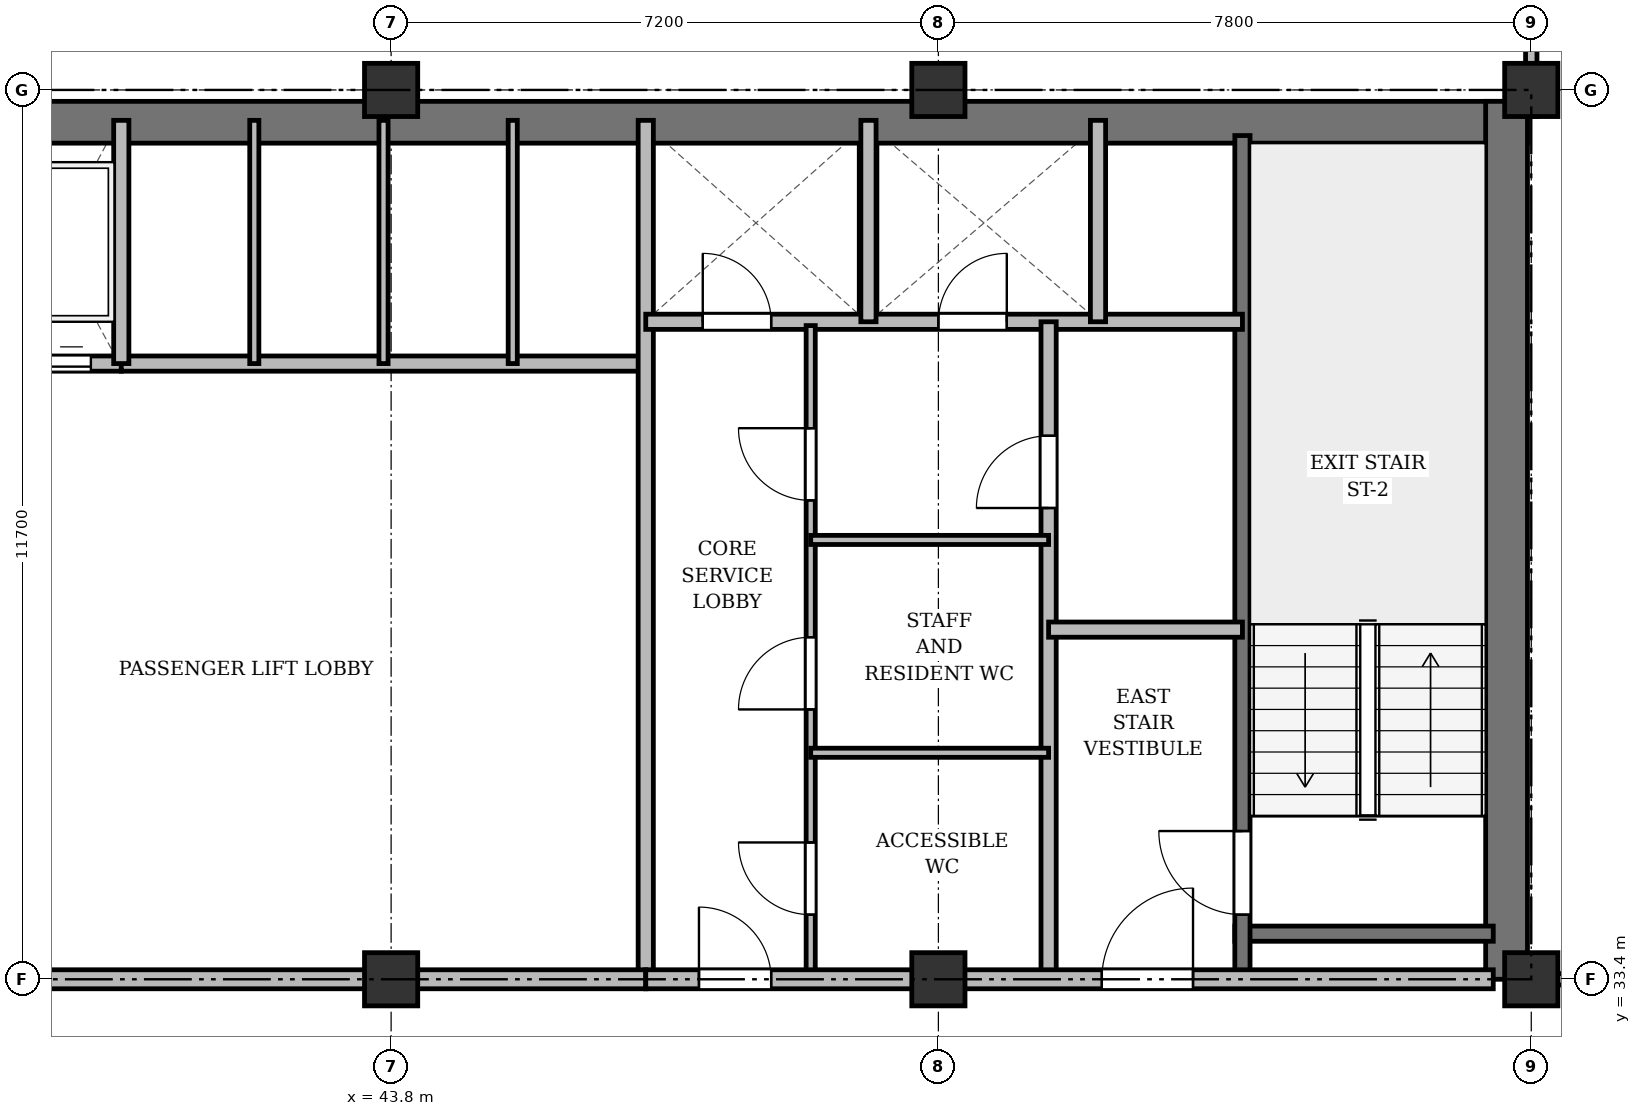
"""IFC4 building model, lengths in metres.
Left out: names, types, materials, properties, quantities, classifications, styles, units other than length and angle.
Written with IfcOpenShell. Run it as: python <this file> out.ifc"""

import sys

from ifc_helpers import new_model, si_unit, direction, frame, frame_2d, origin, origin_2d, place, context, subcontext, project, spatial, rectangle, extrude, source, transform, mapped, element, fill, save


model = new_model("IFC4")
c1 = context("Model", 3, precision=1e-05, world=origin(), true_north=direction((0.0, 1.0)))
c2 = subcontext(c1, "Body", "Model", "MODEL_VIEW")
j1 = project(units=[si_unit("LENGTHUNIT", "METRE"), si_unit("PLANEANGLEUNIT", "RADIAN")], contexts=[c1])
p1 = place(None, origin())
s1 = spatial("IfcSite", under=j1, at=p1, CompositionType="ELEMENT")
p2 = place(p1, origin())
s2 = spatial("IfcBuilding", under=s1, at=p2, CompositionType="ELEMENT")
p3 = place(p2, frame((0.0, 0.0, 194.1)))
s3 = spatial("IfcBuildingStorey", under=s2, at=p3, CompositionType="ELEMENT", Elevation=194.1)
m1 = source(origin(), c2, "Body", "SweptSolid", [
    extrude(rectangle(XDim=0.7, YDim=0.7, at=origin_2d()), origin(), (0.0, 0.0, 1.0), 3.6),
])
for number, where, z_axis, x_axis in (
    (1, (43.8, 33.4, 0.0), (0.0, 0.0, 1.0), (1.0, 0.0, 0.0)),
    (2, (43.8, 45.1, 0.0), (0.0, 0.0, 1.0), (1.0, 0.0, 0.0)),
    (3, (51.0, 33.4, 0.0), (0.0, 0.0, 1.0), (1.0, 0.0, 0.0)),
    (4, (51.0, 45.1, 0.0), (0.0, 0.0, 1.0), (1.0, 0.0, 0.0)),
    (5, (58.8, 33.4, 0.0), (0.0, 0.0, 1.0), (1.0, 0.0, 0.0)),
    (6, (58.8, 45.1, 0.0), (0.0, 0.0, 1.0), (1.0, 0.0, 0.0)),
):
    element("IfcColumn", number, at=place(p3, frame(where, z_axis=z_axis, x_axis=x_axis)), inside=s3, PredefinedType="COLUMN", context=c2, shape_type="MappedRepresentation", body=[
        mapped(m1, transform((0.0, 0.0, 0.0), x_axis=(1.0, 0.0, 0.0), y_axis=(0.0, 1.0, 0.0), z_axis=(0.0, 0.0, 1.0), scale=1.0)),
    ])
p4 = place(p3, frame((15.65, 44.675, 0.0), z_axis=(0.0, 0.0, 1.0), x_axis=(1.0, 0.0, 0.0)))
e7 = element("IfcWall", 7, at=p4, inside=s3, PredefinedType="SHEAR", context=c2, shape_type="SweptSolid", body=[
    extrude(rectangle(XDim=43.1, YDim=0.55, at=frame_2d((21.55, 0.0))), origin(), (0.0, 0.0, 1.0), 3.36),
])
p5 = place(p3, frame((58.475, 33.4, 0.0), z_axis=(0.0, 0.0, 1.0), x_axis=(0.0, 1.0, 0.0)))
e8 = element("IfcWall", 8, at=p5, inside=s3, PredefinedType="SHEAR", context=c2, shape_type="SweptSolid", body=[
    extrude(rectangle(XDim=11.55, YDim=0.55, at=frame_2d((5.775, 0.0))), origin(), (0.0, 0.0, 1.0), 3.36),
])
p6 = place(p3, frame((54.9, 34.0, 0.0), z_axis=(0.0, 0.0, 1.0), x_axis=(1.0, 0.0, 0.0)))
e9 = element("IfcWall", 9, at=p6, inside=s3, PredefinedType="SHEAR", context=c2, shape_type="SweptSolid", body=[
    extrude(rectangle(XDim=3.4, YDim=0.2, at=frame_2d((1.7, 0.0))), origin(), (0.0, 0.0, 1.0), 3.36),
])
p7 = place(p3, frame((55.0, 33.4, 0.0), z_axis=(0.0, 0.0, 1.0), x_axis=(0.0, 1.0, 0.0)))
e10 = element("IfcWall", 10, at=p7, inside=s3, PredefinedType="SHEAR", context=c2, shape_type="SweptSolid", body=[
    extrude(rectangle(XDim=11.1, YDim=0.2, at=frame_2d((5.55, 0.0))), origin(), (0.0, 0.0, 1.0), 3.36),
])
p8 = place(p7, frame((0.85, 0.0, 0.0)))
e11 = element("IfcOpeningElement", 11, at=p8, cuts=e10, PredefinedType="OPENING", context=c2, shape_type="SweptSolid", body=[
    extrude(rectangle(XDim=1.1, YDim=2.15, at=frame_2d((0.55, 1.075))), frame((0.0, 0.11, 0.0), z_axis=(0.0, -1.0, 0.0), x_axis=(1.0, 0.0, 0.0)), (0.0, 0.0, 1.0), 0.22),
])
p9 = place(p3, frame((33.35, 41.5, 0.0), z_axis=(0.0, 0.0, 1.0), x_axis=(1.0, 0.0, 0.0)))
e12 = element("IfcWall", 12, at=p9, inside=s3, PredefinedType="SOLIDWALL", context=c2, shape_type="SweptSolid", body=[
    extrude(rectangle(XDim=6.9, YDim=0.2, at=frame_2d((3.45, 0.0))), origin(), (0.0, 0.0, 1.0), 3.36),
])
p10 = place(p9, frame((0.35, 0.0, 0.0)))
e13 = element("IfcOpeningElement", 13, at=p10, cuts=e12, PredefinedType="OPENING", context=c2, shape_type="SweptSolid", body=[
    extrude(rectangle(XDim=1.05, YDim=2.15, at=frame_2d((0.525, 1.075))), frame((0.0, 0.11, 0.0), z_axis=(0.0, -1.0, 0.0), x_axis=(1.0, 0.0, 0.0)), (0.0, 0.0, 1.0), 0.22),
])
p11 = place(p9, frame((2.05, 0.0, 0.0)))
e14 = element("IfcOpeningElement", 14, at=p11, cuts=e12, PredefinedType="OPENING", context=c2, shape_type="SweptSolid", body=[
    extrude(rectangle(XDim=1.05, YDim=2.15, at=frame_2d((0.525, 1.075))), frame((0.0, 0.11, 0.0), z_axis=(0.0, -1.0, 0.0), x_axis=(1.0, 0.0, 0.0)), (0.0, 0.0, 1.0), 0.22),
])
p12 = place(p9, frame((3.75, 0.0, 0.0)))
e15 = element("IfcOpeningElement", 15, at=p12, cuts=e12, PredefinedType="OPENING", context=c2, shape_type="SweptSolid", body=[
    extrude(rectangle(XDim=1.05, YDim=2.15, at=frame_2d((0.525, 1.075))), frame((0.0, 0.11, 0.0), z_axis=(0.0, -1.0, 0.0), x_axis=(1.0, 0.0, 0.0)), (0.0, 0.0, 1.0), 0.22),
])
p13 = place(p9, frame((5.45, 0.0, 0.0)))
e16 = element("IfcOpeningElement", 16, at=p13, cuts=e12, PredefinedType="OPENING", context=c2, shape_type="SweptSolid", body=[
    extrude(rectangle(XDim=1.05, YDim=2.15, at=frame_2d((0.525, 1.075))), frame((0.0, 0.11, 0.0), z_axis=(0.0, -1.0, 0.0), x_axis=(1.0, 0.0, 0.0)), (0.0, 0.0, 1.0), 0.22),
])
p14 = place(p3, frame((40.25, 41.5, 0.0), z_axis=(0.0, 0.0, 1.0), x_axis=(1.0, 0.0, 0.0)))
e17 = element("IfcWall", 17, at=p14, inside=s3, PredefinedType="SOLIDWALL", context=c2, shape_type="SweptSolid", body=[
    extrude(rectangle(XDim=6.9, YDim=0.2, at=frame_2d((3.45, 0.0))), origin(), (0.0, 0.0, 1.0), 2.86),
])
p15 = place(p3, frame((40.25, 41.5, 0.0), z_axis=(0.0, 0.0, 1.0), x_axis=(0.0, 1.0, 0.0)))
e18 = element("IfcWall", 18, at=p15, inside=s3, PredefinedType="SOLIDWALL", context=c2, shape_type="SweptSolid", body=[
    extrude(rectangle(XDim=3.2, YDim=0.2, at=frame_2d((1.6, 0.0))), origin(), (0.0, 0.0, 1.0), 3.36),
])
p16 = place(p3, frame((42.0, 41.5, 0.0), z_axis=(0.0, 0.0, 1.0), x_axis=(0.0, 1.0, 0.0)))
e19 = element("IfcWall", 19, at=p16, inside=s3, PredefinedType="PARTITIONING", context=c2, shape_type="SweptSolid", body=[
    extrude(rectangle(XDim=3.2, YDim=0.12, at=frame_2d((1.6, 0.0))), origin(), (0.0, 0.0, 1.0), 3.36),
])
p17 = place(p3, frame((43.7, 41.5, 0.0), z_axis=(0.0, 0.0, 1.0), x_axis=(0.0, 1.0, 0.0)))
e20 = element("IfcWall", 20, at=p17, inside=s3, PredefinedType="PARTITIONING", context=c2, shape_type="SweptSolid", body=[
    extrude(rectangle(XDim=3.2, YDim=0.12, at=frame_2d((1.6, 0.0))), origin(), (0.0, 0.0, 1.0), 2.86),
])
p18 = place(p3, frame((45.4, 41.5, 0.0), z_axis=(0.0, 0.0, 1.0), x_axis=(0.0, 1.0, 0.0)))
e21 = element("IfcWall", 21, at=p18, inside=s3, PredefinedType="PARTITIONING", context=c2, shape_type="SweptSolid", body=[
    extrude(rectangle(XDim=3.2, YDim=0.12, at=frame_2d((1.6, 0.0))), origin(), (0.0, 0.0, 1.0), 3.36),
])
p19 = place(p3, frame((47.15, 33.4, 0.0), z_axis=(0.0, 0.0, 1.0), x_axis=(0.0, 1.0, 0.0)))
e22 = element("IfcWall", 22, at=p19, inside=s3, PredefinedType="SOLIDWALL", context=c2, shape_type="SweptSolid", body=[
    extrude(rectangle(XDim=11.3, YDim=0.2, at=frame_2d((5.65, 0.0))), origin(), (0.0, 0.0, 1.0), 2.91),
])
p20 = place(p3, frame((33.3, 33.4, 0.0), z_axis=(0.0, 0.0, 1.0), x_axis=(1.0, 0.0, 0.0)))
e23 = element("IfcWall", 23, at=p20, inside=s3, PredefinedType="PARTITIONING", context=c2, shape_type="SweptSolid", body=[
    extrude(rectangle(XDim=13.85, YDim=0.25, at=frame_2d((6.925, 0.0))), origin(), (0.0, 0.0, 1.0), 2.91),
])
p21 = place(p20, frame((4.2, 0.0, 0.0)))
e24 = element("IfcOpeningElement", 24, at=p21, cuts=e23, PredefinedType="OPENING", context=c2, shape_type="SweptSolid", body=[
    extrude(rectangle(XDim=1.6, YDim=2.2, at=frame_2d((0.8, 1.1))), frame((0.0, 0.135, 0.0), z_axis=(0.0, -1.0, 0.0), x_axis=(1.0, 0.0, 0.0)), (0.0, 0.0, 1.0), 0.27),
])
p22 = place(p3, frame((47.15, 42.05, 0.0), z_axis=(0.0, 0.0, 1.0), x_axis=(1.0, 0.0, 0.0)))
e25 = element("IfcWall", 25, at=p22, inside=s3, PredefinedType="SOLIDWALL", context=c2, shape_type="SweptSolid", body=[
    extrude(rectangle(XDim=7.85, YDim=0.2, at=frame_2d((3.925, 0.0))), origin(), (0.0, 0.0, 1.0), 2.86),
])
p23 = place(p22, frame((0.75, 0.0, 0.0)))
e26 = element("IfcOpeningElement", 26, at=p23, cuts=e25, PredefinedType="OPENING", context=c2, shape_type="SweptSolid", body=[
    extrude(rectangle(XDim=0.9, YDim=2.1, at=frame_2d((0.45, 1.05))), frame((0.0, 0.11, 0.0), z_axis=(0.0, -1.0, 0.0), x_axis=(1.0, 0.0, 0.0)), (0.0, 0.0, 1.0), 0.22),
])
p24 = place(p22, frame((3.85, 0.0, 0.0)))
e27 = element("IfcOpeningElement", 27, at=p24, cuts=e25, PredefinedType="OPENING", context=c2, shape_type="SweptSolid", body=[
    extrude(rectangle(XDim=0.9, YDim=2.1, at=frame_2d((0.45, 1.05))), frame((0.0, 0.11, 0.0), z_axis=(0.0, -1.0, 0.0), x_axis=(1.0, 0.0, 0.0)), (0.0, 0.0, 1.0), 0.22),
])
for number, where, z_axis, x_axis in (
    (28, (50.08, 42.05, 0.0), (0.0, 0.0, 1.0), (0.0, 1.0, 0.0)),
    (29, (53.1, 42.05, 0.0), (0.0, 0.0, 1.0), (0.0, 1.0, 0.0)),
):
    element("IfcWall", number, at=place(p3, frame(where, z_axis=z_axis, x_axis=x_axis)), inside=s3, PredefinedType="SOLIDWALL", context=c2, shape_type="SweptSolid", body=[
        extrude(rectangle(XDim=2.65, YDim=0.2, at=frame_2d((1.325, 0.0))), origin(), (0.0, 0.0, 1.0), 3.36),
    ])
p25 = place(p3, frame((52.45, 33.4, 0.0), z_axis=(0.0, 0.0, 1.0), x_axis=(0.0, 1.0, 0.0)))
e30 = element("IfcWall", 30, at=p25, inside=s3, PredefinedType="PARTITIONING", context=c2, shape_type="SweptSolid", body=[
    extrude(rectangle(XDim=8.65, YDim=0.2, at=frame_2d((4.325, 0.0))), origin(), (0.0, 0.0, 1.0), 2.91),
])
p26 = place(p25, frame((6.2, 0.0, 0.0)))
e31 = element("IfcOpeningElement", 31, at=p26, cuts=e30, PredefinedType="OPENING", context=c2, shape_type="SweptSolid", body=[
    extrude(rectangle(XDim=0.95, YDim=2.15, at=frame_2d((0.475, 1.075))), frame((0.0, 0.11, 0.0), z_axis=(0.0, -1.0, 0.0), x_axis=(1.0, 0.0, 0.0)), (0.0, 0.0, 1.0), 0.22),
])
p27 = place(p3, frame((52.45, 38.0, 0.0), z_axis=(0.0, 0.0, 1.0), x_axis=(1.0, 0.0, 0.0)))
e32 = element("IfcWall", 32, at=p27, inside=s3, PredefinedType="PARTITIONING", context=c2, shape_type="SweptSolid", body=[
    extrude(rectangle(XDim=2.55, YDim=0.2, at=frame_2d((1.275, 0.0))), origin(), (0.0, 0.0, 1.0), 3.36),
])
p28 = place(p3, frame((49.32, 33.4, 0.0), z_axis=(0.0, 0.0, 1.0), x_axis=(0.0, 1.0, 0.0)))
e33 = element("IfcWall", 33, at=p28, inside=s3, PredefinedType="PARTITIONING", context=c2, shape_type="SweptSolid", body=[
    extrude(rectangle(XDim=8.6, YDim=0.12, at=frame_2d((4.3, 0.0))), origin(), (0.0, 0.0, 1.0), 2.91),
])
p29 = place(p28, frame((0.85, 0.0, 0.0)))
e34 = element("IfcOpeningElement", 34, at=p29, cuts=e33, PredefinedType="OPENING", context=c2, shape_type="SweptSolid", body=[
    extrude(rectangle(XDim=0.95, YDim=2.15, at=frame_2d((0.475, 1.075))), frame((0.0, 0.07, 0.0), z_axis=(0.0, -1.0, 0.0), x_axis=(1.0, 0.0, 0.0)), (0.0, 0.0, 1.0), 0.14),
])
p30 = place(p28, frame((3.55, 0.0, 0.0)))
e35 = element("IfcOpeningElement", 35, at=p30, cuts=e33, PredefinedType="OPENING", context=c2, shape_type="SweptSolid", body=[
    extrude(rectangle(XDim=0.95, YDim=2.15, at=frame_2d((0.475, 1.075))), frame((0.0, 0.07, 0.0), z_axis=(0.0, -1.0, 0.0), x_axis=(1.0, 0.0, 0.0)), (0.0, 0.0, 1.0), 0.14),
])
p31 = place(p28, frame((6.3, 0.0, 0.0)))
e36 = element("IfcOpeningElement", 36, at=p31, cuts=e33, PredefinedType="OPENING", context=c2, shape_type="SweptSolid", body=[
    extrude(rectangle(XDim=0.95, YDim=2.15, at=frame_2d((0.475, 1.075))), frame((0.0, 0.07, 0.0), z_axis=(0.0, -1.0, 0.0), x_axis=(1.0, 0.0, 0.0)), (0.0, 0.0, 1.0), 0.14),
])
for number, where, z_axis, x_axis in (
    (37, (49.32, 36.38, 0.0), (0.0, 0.0, 1.0), (1.0, 0.0, 0.0)),
    (38, (49.32, 39.18, 0.0), (0.0, 0.0, 1.0), (1.0, 0.0, 0.0)),
):
    element("IfcWall", number, at=place(p3, frame(where, z_axis=z_axis, x_axis=x_axis)), inside=s3, PredefinedType="PARTITIONING", context=c2, shape_type="SweptSolid", body=[
        extrude(rectangle(XDim=3.13, YDim=0.12, at=frame_2d((1.565, 0.0))), origin(), (0.0, 0.0, 1.0), 2.86),
    ])
p32 = place(p3, frame((47.15, 33.4, 0.0), z_axis=(0.0, 0.0, 1.0), x_axis=(1.0, 0.0, 0.0)))
e39 = element("IfcWall", 39, at=p32, inside=s3, PredefinedType="PARTITIONING", context=c2, shape_type="SweptSolid", body=[
    extrude(rectangle(XDim=11.15, YDim=0.25, at=frame_2d((5.575, 0.0))), origin(), (0.0, 0.0, 1.0), 2.91),
])
p33 = place(p32, frame((0.7, 0.0, 0.0)))
e40 = element("IfcOpeningElement", 40, at=p33, cuts=e39, PredefinedType="OPENING", context=c2, shape_type="SweptSolid", body=[
    extrude(rectangle(XDim=0.95, YDim=2.15, at=frame_2d((0.475, 1.075))), frame((0.0, 0.135, 0.0), z_axis=(0.0, -1.0, 0.0), x_axis=(1.0, 0.0, 0.0)), (0.0, 0.0, 1.0), 0.27),
])
p34 = place(p32, frame((6.0, 0.0, 0.0)))
e41 = element("IfcOpeningElement", 41, at=p34, cuts=e39, PredefinedType="OPENING", context=c2, shape_type="SweptSolid", body=[
    extrude(rectangle(XDim=1.2, YDim=2.15, at=frame_2d((0.6, 1.075))), frame((0.0, 0.135, 0.0), z_axis=(0.0, -1.0, 0.0), x_axis=(1.0, 0.0, 0.0)), (0.0, 0.0, 1.0), 0.27),
])
p35 = place(p3, frame((58.8, 33.4, 0.0), z_axis=(0.0, 0.0, 1.0), x_axis=(1.0, 0.0, 0.0)))
e42 = element("IfcWall", 42, at=p35, inside=s3, PredefinedType="PARTITIONING", context=c2, shape_type="SweptSolid", body=[
    extrude(rectangle(XDim=7.35, YDim=0.15, at=frame_2d((3.675, 0.0))), origin(), (0.0, 0.0, 1.0), 2.91),
])
p36 = place(p35, frame((3.192, 0.0, 0.0)))
e43 = element("IfcOpeningElement", 43, at=p36, cuts=e42, PredefinedType="OPENING", context=c2, shape_type="SweptSolid", body=[
    extrude(rectangle(XDim=0.95, YDim=2.15, at=frame_2d((0.475, 1.075))), frame((0.0, 0.085, 0.0), z_axis=(0.0, -1.0, 0.0), x_axis=(1.0, 0.0, 0.0)), (0.0, 0.0, 1.0), 0.17),
])
p37 = place(p3, frame((58.8, 44.75, 0.0), z_axis=(0.0, 0.0, 1.0), x_axis=(0.0, 1.0, 0.0)))
e44 = element("IfcWall", 44, at=p37, inside=s3, PredefinedType="PARTITIONING", context=c2, shape_type="SweptSolid", body=[
    extrude(rectangle(XDim=3.61, YDim=0.15, at=frame_2d((1.805, 0.0))), origin(), (0.0, 0.0, 1.0), 2.86),
])
p38 = place(p37, frame((1.1, 0.0, 0.0)))
e45 = element("IfcOpeningElement", 45, at=p38, cuts=e44, PredefinedType="OPENING", context=c2, shape_type="SweptSolid", body=[
    extrude(rectangle(XDim=0.95, YDim=2.15, at=frame_2d((0.475, 1.075))), frame((0.0, 0.085, 0.0), z_axis=(0.0, -1.0, 0.0), x_axis=(1.0, 0.0, 0.0)), (0.0, 0.0, 1.0), 0.17),
])
m2 = source(origin(), c2, "Body", "SweptSolid", [
    extrude(rectangle(XDim=1.1, YDim=2.15, at=frame_2d((0.55, 1.075))), frame((0.0, 0.025, 0.0), z_axis=(0.0, -1.0, 0.0), x_axis=(1.0, 0.0, 0.0)), (0.0, 0.0, 1.0), 0.05),
])
p39 = place(p8, origin())
e46 = element("IfcDoor", 46, at=p39, inside=s3, OperationType="SINGLE_SWING_RIGHT", PredefinedType="DOOR", context=c2, shape_type="MappedRepresentation", body=[
    mapped(m2, transform((0.0, 0.0, 0.0), x_axis=(1.0, 0.0, 0.0), y_axis=(0.0, 1.0, 0.0), z_axis=(0.0, 0.0, 1.0), scale=1.0)),
])
fill(e11, e46)
m3 = source(origin(), c2, "Body", "SweptSolid", [
    extrude(rectangle(XDim=1.05, YDim=2.15, at=frame_2d((0.525, 1.075))), frame((0.0, 0.025, 0.0), z_axis=(0.0, -1.0, 0.0), x_axis=(1.0, 0.0, 0.0)), (0.0, 0.0, 1.0), 0.05),
])
p40 = place(p13, origin())
e47 = element("IfcDoor", 47, at=p40, inside=s3, OperationType="DOUBLE_DOOR_SLIDING", PredefinedType="DOOR", context=c2, shape_type="MappedRepresentation", body=[
    mapped(m3, transform((0.0, 0.0, 0.0), x_axis=(1.0, 0.0, 0.0), y_axis=(0.0, 1.0, 0.0), z_axis=(0.0, 0.0, 1.0), scale=1.0)),
])
fill(e16, e47)
m4 = source(origin(), c2, "Body", "SweptSolid", [
    extrude(rectangle(XDim=0.9, YDim=2.1, at=frame_2d((0.45, 1.05))), frame((0.0, 0.025, 0.0), z_axis=(0.0, -1.0, 0.0), x_axis=(1.0, 0.0, 0.0)), (0.0, 0.0, 1.0), 0.05),
])
p41 = place(p23, origin())
e48 = element("IfcDoor", 48, at=p41, inside=s3, OperationType="SINGLE_SWING_LEFT", PredefinedType="DOOR", context=c2, shape_type="MappedRepresentation", body=[
    mapped(m4, transform((0.0, 0.0, 0.0), x_axis=(1.0, 0.0, 0.0), y_axis=(0.0, 1.0, 0.0), z_axis=(0.0, 0.0, 1.0), scale=1.0)),
])
fill(e26, e48)
p42 = place(p24, origin())
e49 = element("IfcDoor", 49, at=p42, inside=s3, OperationType="SINGLE_SWING_RIGHT", PredefinedType="DOOR", context=c2, shape_type="MappedRepresentation", body=[
    mapped(m4, transform((0.0, 0.0, 0.0), x_axis=(1.0, 0.0, 0.0), y_axis=(0.0, 1.0, 0.0), z_axis=(0.0, 0.0, 1.0), scale=1.0)),
])
fill(e27, e49)
m5 = source(origin(), c2, "Body", "SweptSolid", [
    extrude(rectangle(XDim=0.95, YDim=2.15, at=frame_2d((0.475, 1.075))), frame((0.0, 0.025, 0.0), z_axis=(0.0, -1.0, 0.0), x_axis=(1.0, 0.0, 0.0)), (0.0, 0.0, 1.0), 0.05),
])
p43 = place(p26, origin())
e50 = element("IfcDoor", 50, at=p43, inside=s3, OperationType="SINGLE_SWING_LEFT", PredefinedType="DOOR", context=c2, shape_type="MappedRepresentation", body=[
    mapped(m5, transform((0.0, 0.0, 0.0), x_axis=(1.0, 0.0, 0.0), y_axis=(0.0, 1.0, 0.0), z_axis=(0.0, 0.0, 1.0), scale=1.0)),
])
fill(e31, e50)
p44 = place(p29, origin())
e51 = element("IfcDoor", 51, at=p44, inside=s3, OperationType="SINGLE_SWING_RIGHT", PredefinedType="DOOR", context=c2, shape_type="MappedRepresentation", body=[
    mapped(m5, transform((0.0, 0.0, 0.0), x_axis=(1.0, 0.0, 0.0), y_axis=(0.0, 1.0, 0.0), z_axis=(0.0, 0.0, 1.0), scale=1.0)),
])
fill(e34, e51)
p45 = place(p30, origin())
e52 = element("IfcDoor", 52, at=p45, inside=s3, OperationType="SINGLE_SWING_LEFT", PredefinedType="DOOR", context=c2, shape_type="MappedRepresentation", body=[
    mapped(m5, transform((0.0, 0.0, 0.0), x_axis=(1.0, 0.0, 0.0), y_axis=(0.0, 1.0, 0.0), z_axis=(0.0, 0.0, 1.0), scale=1.0)),
])
fill(e35, e52)
p46 = place(p31, origin())
e53 = element("IfcDoor", 53, at=p46, inside=s3, OperationType="SINGLE_SWING_RIGHT", PredefinedType="DOOR", context=c2, shape_type="MappedRepresentation", body=[
    mapped(m5, transform((0.0, 0.0, 0.0), x_axis=(1.0, 0.0, 0.0), y_axis=(0.0, 1.0, 0.0), z_axis=(0.0, 0.0, 1.0), scale=1.0)),
])
fill(e36, e53)
p47 = place(p33, origin())
e54 = element("IfcDoor", 54, at=p47, inside=s3, OperationType="SINGLE_SWING_LEFT", PredefinedType="DOOR", context=c2, shape_type="MappedRepresentation", body=[
    mapped(m5, transform((0.0, 0.0, 0.0), x_axis=(1.0, 0.0, 0.0), y_axis=(0.0, 1.0, 0.0), z_axis=(0.0, 0.0, 1.0), scale=1.0)),
])
fill(e40, e54)
m6 = source(origin(), c2, "Body", "SweptSolid", [
    extrude(rectangle(XDim=1.2, YDim=2.15, at=frame_2d((0.6, 1.075))), frame((0.0, 0.025, 0.0), z_axis=(0.0, -1.0, 0.0), x_axis=(1.0, 0.0, 0.0)), (0.0, 0.0, 1.0), 0.05),
])
p48 = place(p34, origin())
e55 = element("IfcDoor", 55, at=p48, inside=s3, OperationType="SINGLE_SWING_RIGHT", PredefinedType="DOOR", context=c2, shape_type="MappedRepresentation", body=[
    mapped(m6, transform((0.0, 0.0, 0.0), x_axis=(1.0, 0.0, 0.0), y_axis=(0.0, 1.0, 0.0), z_axis=(0.0, 0.0, 1.0), scale=1.0)),
])
fill(e41, e55)
save(model, sys.argv[1])
